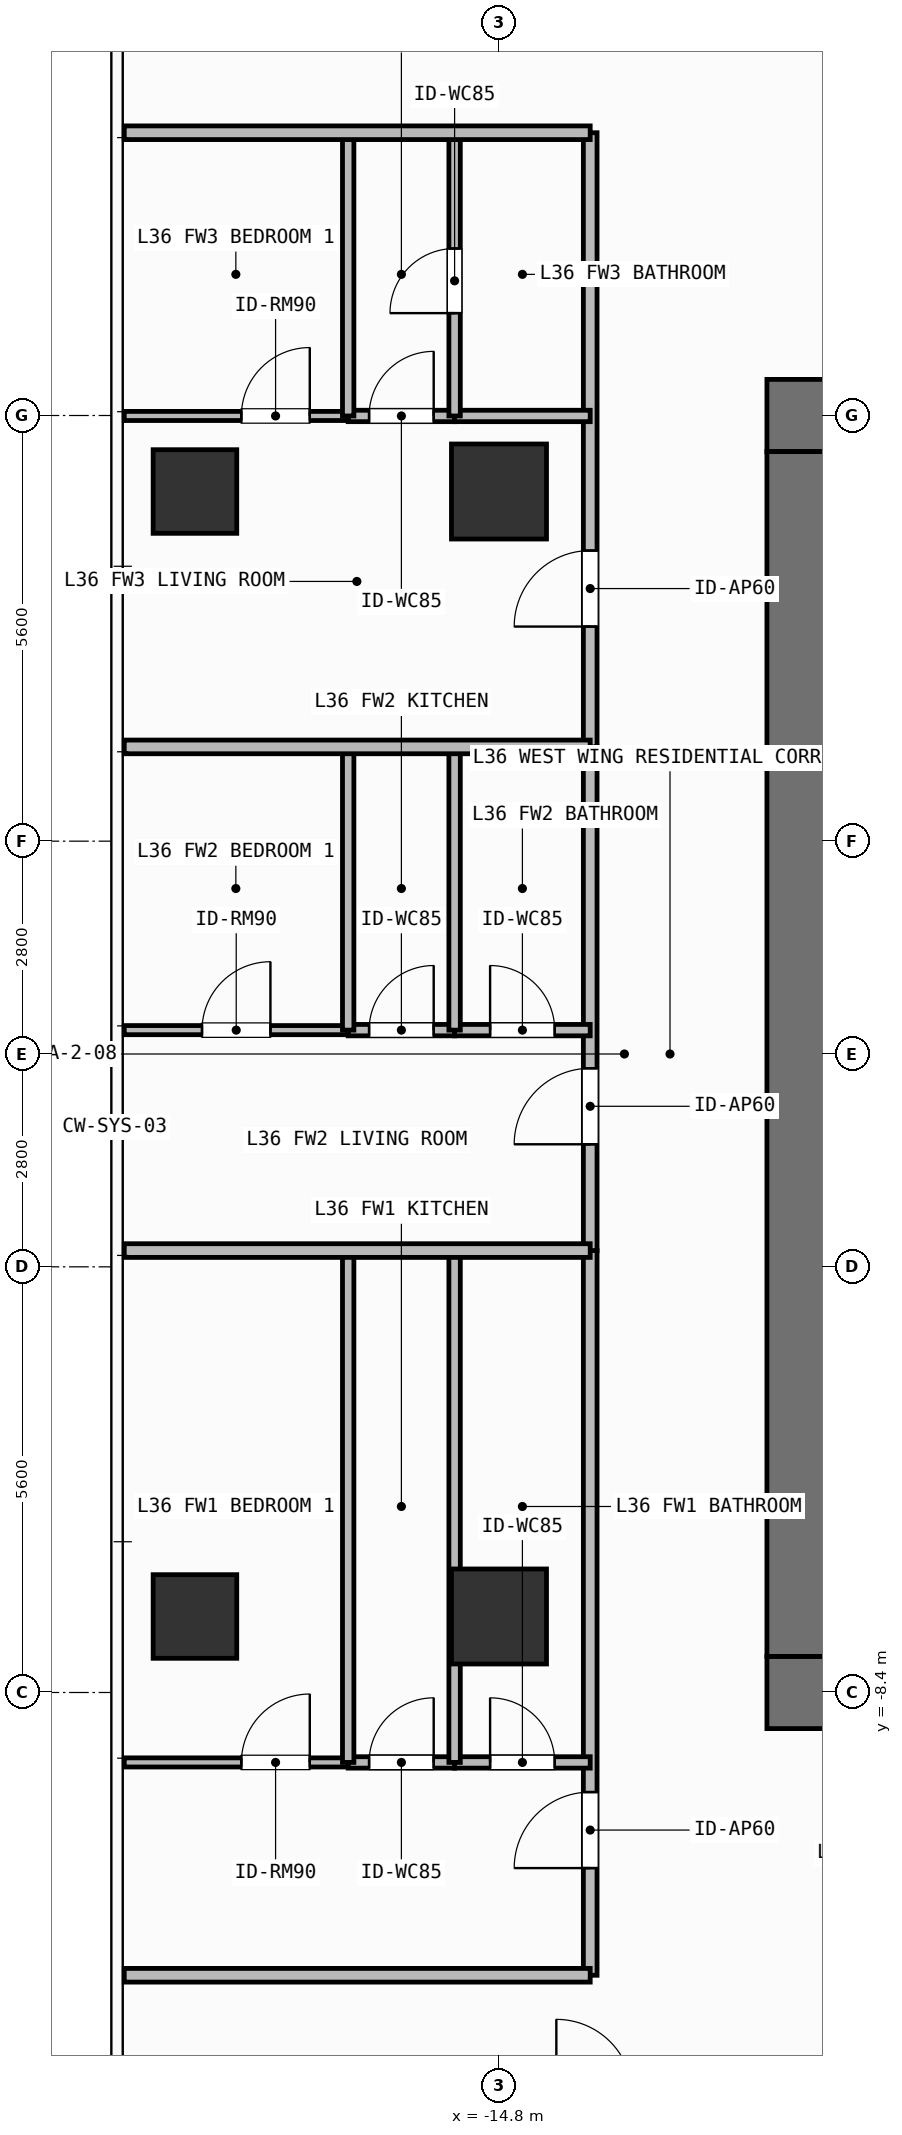
"""IFC4 building model, lengths in metres.
Left out: names, types, materials, properties, quantities, classifications, styles, units other than length and angle.
Written with IfcOpenShell. Run it as: python <this file> out.ifc"""

import sys

from ifc_helpers import new_model, si_unit, direction, frame, frame_2d, origin, origin_2d, place, context, subcontext, project, spatial, rectangle, extrude, element, fill, save


model = new_model("IFC4")
c1 = context("Model", 3, precision=1e-05, world=origin(), true_north=direction((0.0, 1.0)))
c2 = subcontext(c1, "Body", "Model", "MODEL_VIEW")
j1 = project(units=[si_unit("LENGTHUNIT", "METRE"), si_unit("PLANEANGLEUNIT", "RADIAN")], contexts=[c1])
p1 = place(None, origin())
s1 = spatial("IfcSite", under=j1, at=p1, CompositionType="ELEMENT")
p2 = place(p1, origin())
s2 = spatial("IfcBuilding", under=s1, at=p2, CompositionType="ELEMENT")
p3 = place(p2, frame((0.0, 0.0, 144.6)))
s3 = spatial("IfcBuildingStorey", under=s2, at=p3, CompositionType="ELEMENT", Elevation=144.6)
for number, where, z_axis, x_axis in (
    (1, (-11.275, -8.4, 0.0), (0.0, 0.0, 1.0), (1.0, 0.0, 0.0)),
    (2, (-11.275, 8.4, 0.0), (0.0, 0.0, 1.0), (1.0, 0.0, 0.0)),
):
    element("IfcWall", number, at=place(p3, frame(where, z_axis=z_axis, x_axis=x_axis)), inside=s3, PredefinedType="SHEAR", context=c2, shape_type="SweptSolid", body=[
        extrude(rectangle(XDim=1.575, YDim=0.95, at=frame_2d((0.788, 0.0))), origin(), (0.0, 0.0, 1.0), 3.9),
    ])
p4 = place(p3, frame((-10.8, -7.925, 0.0), z_axis=(0.0, 0.0, 1.0), x_axis=(0.0, 1.0, 0.0)))
e3 = element("IfcWall", 3, at=p4, inside=s3, PredefinedType="SHEAR", context=c2, shape_type="SweptSolid", body=[
    extrude(rectangle(XDim=15.85, YDim=0.95, at=frame_2d((7.925, 0.0))), origin(), (0.0, 0.0, 1.0), 3.9),
])
for number, where, z_axis, x_axis in (
    (4, (-14.8, -7.4, 0.0), (0.0, 0.0, 1.0), (1.0, 0.0, 0.0)),
    (5, (-14.8, 7.4, 0.0), (0.0, 0.0, 1.0), (1.0, 0.0, 0.0)),
):
    element("IfcColumn", number, at=place(p3, frame(where, z_axis=z_axis, x_axis=x_axis)), inside=s3, PredefinedType="COLUMN", context=c2, shape_type="SweptSolid", body=[
        extrude(rectangle(XDim=1.25, YDim=1.25, at=origin_2d()), origin(), (0.0, 0.0, 1.0), 3.9),
    ])
for number, where, z_axis, x_axis in (
    (6, (-18.8, -7.4, 0.0), (0.0, 0.0, 1.0), (1.0, 0.0, 0.0)),
    (7, (-18.8, 7.4, 0.0), (0.0, 0.0, 1.0), (1.0, 0.0, 0.0)),
):
    element("IfcColumn", number, at=place(p3, frame(where, z_axis=z_axis, x_axis=x_axis)), inside=s3, PredefinedType="COLUMN", context=c2, shape_type="SweptSolid", body=[
        extrude(rectangle(XDim=1.1, YDim=1.1, at=origin_2d()), origin(), (0.0, 0.0, 1.0), 3.9),
    ])
p5 = place(p3, frame((-13.6, -12.12, 0.0), z_axis=(0.0, 0.0, 1.0), x_axis=(0.0, 1.0, 0.0)))
e8 = element("IfcWall", 8, at=p5, inside=s3, PredefinedType="PARTITIONING", context=c2, shape_type="SweptSolid", body=[
    extrude(rectangle(XDim=9.534, YDim=0.18, at=frame_2d((4.767, 0.0))), origin(), (0.0, 0.0, 1.0), 3.68),
])
p6 = place(p5, frame((1.41, 0.0, 0.0)))
e9 = element("IfcOpeningElement", 9, at=p6, cuts=e8, PredefinedType="OPENING", context=c2, shape_type="SweptSolid", body=[
    extrude(rectangle(XDim=1.0, YDim=2.2, at=frame_2d((0.5, 1.1))), frame((0.0, 0.1, 0.0), z_axis=(0.0, -1.0, 0.0), x_axis=(1.0, 0.0, 0.0)), (0.0, 0.0, 1.0), 0.2),
])
p7 = place(p3, frame((-16.784, -9.32, 0.0), z_axis=(0.0, 0.0, 1.0), x_axis=(1.0, 0.0, 0.0)))
e10 = element("IfcWall", 10, at=p7, inside=s3, PredefinedType="PARTITIONING", context=c2, shape_type="SweptSolid", body=[
    extrude(rectangle(XDim=1.4, YDim=0.15, at=frame_2d((0.7, 0.0))), origin(), (0.0, 0.0, 1.0), 3.68),
])
p8 = place(p7, frame((0.275, 0.0, 0.0)))
e11 = element("IfcOpeningElement", 11, at=p8, cuts=e10, PredefinedType="OPENING", context=c2, shape_type="SweptSolid", body=[
    extrude(rectangle(XDim=0.85, YDim=2.1, at=frame_2d((0.425, 1.05))), frame((0.0, 0.085, 0.0), z_axis=(0.0, -1.0, 0.0), x_axis=(1.0, 0.0, 0.0)), (0.0, 0.0, 1.0), 0.17),
])
p9 = place(p3, frame((-15.384, -9.32, 0.0), z_axis=(0.0, 0.0, 1.0), x_axis=(1.0, 0.0, 0.0)))
e12 = element("IfcWall", 12, at=p9, inside=s3, PredefinedType="PARTITIONING", context=c2, shape_type="SweptSolid", body=[
    extrude(rectangle(XDim=1.784, YDim=0.15, at=frame_2d((0.892, 0.0))), origin(), (0.0, 0.0, 1.0), 3.68),
])
p10 = place(p9, frame((0.467, 0.0, 0.0)))
e13 = element("IfcOpeningElement", 13, at=p10, cuts=e12, PredefinedType="OPENING", context=c2, shape_type="SweptSolid", body=[
    extrude(rectangle(XDim=0.85, YDim=2.1, at=frame_2d((0.425, 1.05))), frame((0.0, 0.085, 0.0), z_axis=(0.0, -1.0, 0.0), x_axis=(1.0, 0.0, 0.0)), (0.0, 0.0, 1.0), 0.17),
])
p11 = place(p3, frame((-19.73, -9.32, 0.0), z_axis=(0.0, 0.0, 1.0), x_axis=(1.0, 0.0, 0.0)))
e14 = element("IfcWall", 14, at=p11, inside=s3, PredefinedType="PARTITIONING", context=c2, shape_type="SweptSolid", body=[
    extrude(rectangle(XDim=2.946, YDim=0.12, at=frame_2d((1.473, 0.0))), origin(), (0.0, 0.0, 1.0), 3.68),
])
p12 = place(p11, frame((1.541, 0.0, 0.0)))
e15 = element("IfcOpeningElement", 15, at=p12, cuts=e14, PredefinedType="OPENING", context=c2, shape_type="SweptSolid", body=[
    extrude(rectangle(XDim=0.9, YDim=2.1, at=frame_2d((0.45, 1.05))), frame((0.0, 0.07, 0.0), z_axis=(0.0, -1.0, 0.0), x_axis=(1.0, 0.0, 0.0)), (0.0, 0.0, 1.0), 0.14),
])
p13 = place(p3, frame((-13.6, -2.586, 0.0), z_axis=(0.0, 0.0, 1.0), x_axis=(0.0, 1.0, 0.0)))
e16 = element("IfcWall", 16, at=p13, inside=s3, PredefinedType="PARTITIONING", context=c2, shape_type="SweptSolid", body=[
    extrude(rectangle(XDim=6.626, YDim=0.18, at=frame_2d((3.313, 0.0))), origin(), (0.0, 0.0, 1.0), 3.68),
])
p14 = place(p13, frame((1.398, 0.0, 0.0)))
e17 = element("IfcOpeningElement", 17, at=p14, cuts=e16, PredefinedType="OPENING", context=c2, shape_type="SweptSolid", body=[
    extrude(rectangle(XDim=1.0, YDim=2.2, at=frame_2d((0.5, 1.1))), frame((0.0, 0.1, 0.0), z_axis=(0.0, -1.0, 0.0), x_axis=(1.0, 0.0, 0.0)), (0.0, 0.0, 1.0), 0.2),
])
p15 = place(p3, frame((-16.784, 0.314, 0.0), z_axis=(0.0, 0.0, 1.0), x_axis=(1.0, 0.0, 0.0)))
e18 = element("IfcWall", 18, at=p15, inside=s3, PredefinedType="PARTITIONING", context=c2, shape_type="SweptSolid", body=[
    extrude(rectangle(XDim=1.4, YDim=0.15, at=frame_2d((0.7, 0.0))), origin(), (0.0, 0.0, 1.0), 3.68),
])
p16 = place(p15, frame((0.275, 0.0, 0.0)))
e19 = element("IfcOpeningElement", 19, at=p16, cuts=e18, PredefinedType="OPENING", context=c2, shape_type="SweptSolid", body=[
    extrude(rectangle(XDim=0.85, YDim=2.1, at=frame_2d((0.425, 1.05))), frame((0.0, 0.085, 0.0), z_axis=(0.0, -1.0, 0.0), x_axis=(1.0, 0.0, 0.0)), (0.0, 0.0, 1.0), 0.17),
])
p17 = place(p3, frame((-15.384, 0.314, 0.0), z_axis=(0.0, 0.0, 1.0), x_axis=(1.0, 0.0, 0.0)))
e20 = element("IfcWall", 20, at=p17, inside=s3, PredefinedType="PARTITIONING", context=c2, shape_type="SweptSolid", body=[
    extrude(rectangle(XDim=1.784, YDim=0.15, at=frame_2d((0.892, 0.0))), origin(), (0.0, 0.0, 1.0), 3.68),
])
p18 = place(p17, frame((0.467, 0.0, 0.0)))
e21 = element("IfcOpeningElement", 21, at=p18, cuts=e20, PredefinedType="OPENING", context=c2, shape_type="SweptSolid", body=[
    extrude(rectangle(XDim=0.85, YDim=2.1, at=frame_2d((0.425, 1.05))), frame((0.0, 0.085, 0.0), z_axis=(0.0, -1.0, 0.0), x_axis=(1.0, 0.0, 0.0)), (0.0, 0.0, 1.0), 0.17),
])
p19 = place(p3, frame((-19.73, 0.314, 0.0), z_axis=(0.0, 0.0, 1.0), x_axis=(1.0, 0.0, 0.0)))
e22 = element("IfcWall", 22, at=p19, inside=s3, PredefinedType="PARTITIONING", context=c2, shape_type="SweptSolid", body=[
    extrude(rectangle(XDim=2.946, YDim=0.12, at=frame_2d((1.473, 0.0))), origin(), (0.0, 0.0, 1.0), 3.68),
])
p20 = place(p19, frame((1.023, 0.0, 0.0)))
e23 = element("IfcOpeningElement", 23, at=p20, cuts=e22, PredefinedType="OPENING", context=c2, shape_type="SweptSolid", body=[
    extrude(rectangle(XDim=0.9, YDim=2.1, at=frame_2d((0.45, 1.05))), frame((0.0, 0.07, 0.0), z_axis=(0.0, -1.0, 0.0), x_axis=(1.0, 0.0, 0.0)), (0.0, 0.0, 1.0), 0.14),
])
p21 = place(p3, frame((-13.6, 4.04, 0.0), z_axis=(0.0, 0.0, 1.0), x_axis=(0.0, 1.0, 0.0)))
e24 = element("IfcWall", 24, at=p21, inside=s3, PredefinedType="PARTITIONING", context=c2, shape_type="SweptSolid", body=[
    extrude(rectangle(XDim=8.08, YDim=0.18, at=frame_2d((4.04, 0.0))), origin(), (0.0, 0.0, 1.0), 3.68),
])
p22 = place(p21, frame((1.583, 0.0, 0.0)))
e25 = element("IfcOpeningElement", 25, at=p22, cuts=e24, PredefinedType="OPENING", context=c2, shape_type="SweptSolid", body=[
    extrude(rectangle(XDim=1.0, YDim=2.2, at=frame_2d((0.5, 1.1))), frame((0.0, 0.1, 0.0), z_axis=(0.0, -1.0, 0.0), x_axis=(1.0, 0.0, 0.0)), (0.0, 0.0, 1.0), 0.2),
])
p23 = place(p3, frame((-16.784, 8.394, 0.0), z_axis=(0.0, 0.0, 1.0), x_axis=(1.0, 0.0, 0.0)))
e26 = element("IfcWall", 26, at=p23, inside=s3, PredefinedType="PARTITIONING", context=c2, shape_type="SweptSolid", body=[
    extrude(rectangle(XDim=1.4, YDim=0.15, at=frame_2d((0.7, 0.0))), origin(), (0.0, 0.0, 1.0), 3.68),
])
p24 = place(p23, frame((0.275, 0.0, 0.0)))
e27 = element("IfcOpeningElement", 27, at=p24, cuts=e26, PredefinedType="OPENING", context=c2, shape_type="SweptSolid", body=[
    extrude(rectangle(XDim=0.85, YDim=2.1, at=frame_2d((0.425, 1.05))), frame((0.0, 0.085, 0.0), z_axis=(0.0, -1.0, 0.0), x_axis=(1.0, 0.0, 0.0)), (0.0, 0.0, 1.0), 0.17),
])
p25 = place(p3, frame((-15.384, 8.394, 0.0), z_axis=(0.0, 0.0, 1.0), x_axis=(1.0, 0.0, 0.0)))
e28 = element("IfcWall", 28, at=p25, inside=s3, PredefinedType="PARTITIONING", context=c2, shape_type="SweptSolid", body=[
    extrude(rectangle(XDim=1.784, YDim=0.15, at=frame_2d((0.892, 0.0))), origin(), (0.0, 0.0, 1.0), 3.68),
])
p26 = place(p3, frame((-19.73, 8.394, 0.0), z_axis=(0.0, 0.0, 1.0), x_axis=(1.0, 0.0, 0.0)))
e29 = element("IfcWall", 29, at=p26, inside=s3, PredefinedType="PARTITIONING", context=c2, shape_type="SweptSolid", body=[
    extrude(rectangle(XDim=2.946, YDim=0.12, at=frame_2d((1.473, 0.0))), origin(), (0.0, 0.0, 1.0), 3.68),
])
p27 = place(p26, frame((1.541, 0.0, 0.0)))
e30 = element("IfcOpeningElement", 30, at=p27, cuts=e29, PredefinedType="OPENING", context=c2, shape_type="SweptSolid", body=[
    extrude(rectangle(XDim=0.9, YDim=2.1, at=frame_2d((0.45, 1.05))), frame((0.0, 0.07, 0.0), z_axis=(0.0, -1.0, 0.0), x_axis=(1.0, 0.0, 0.0)), (0.0, 0.0, 1.0), 0.14),
])
for number, where, z_axis, x_axis in (
    (31, (-15.384, -9.32, 0.0), (0.0, 0.0, 1.0), (0.0, 1.0, 0.0)),
    (32, (-16.784, -9.32, 0.0), (0.0, 0.0, 1.0), (0.0, 1.0, 0.0)),
):
    element("IfcWall", number, at=place(p3, frame(where, z_axis=z_axis, x_axis=x_axis)), inside=s3, PredefinedType="PARTITIONING", context=c2, shape_type="SweptSolid", body=[
        extrude(rectangle(XDim=6.734, YDim=0.15, at=frame_2d((3.367, 0.0))), origin(), (0.0, 0.0, 1.0), 3.68),
    ])
for number, where, z_axis, x_axis in (
    (33, (-15.384, 0.314, 0.0), (0.0, 0.0, 1.0), (0.0, 1.0, 0.0)),
    (34, (-16.784, 0.314, 0.0), (0.0, 0.0, 1.0), (0.0, 1.0, 0.0)),
):
    element("IfcWall", number, at=place(p3, frame(where, z_axis=z_axis, x_axis=x_axis)), inside=s3, PredefinedType="PARTITIONING", context=c2, shape_type="SweptSolid", body=[
        extrude(rectangle(XDim=3.726, YDim=0.15, at=frame_2d((1.863, 0.0))), origin(), (0.0, 0.0, 1.0), 3.68),
    ])
p28 = place(p3, frame((-19.73, -2.586, 0.0), z_axis=(0.0, 0.0, 1.0), x_axis=(1.0, 0.0, 0.0)))
e35 = element("IfcWall", 35, at=p28, inside=s3, PredefinedType="PARTITIONING", context=c2, shape_type="SweptSolid", body=[
    extrude(rectangle(XDim=6.13, YDim=0.18, at=frame_2d((3.065, 0.0))), origin(), (0.0, 0.0, 1.0), 3.68),
])
p29 = place(p3, frame((-15.384, 8.394, 0.0), z_axis=(0.0, 0.0, 1.0), x_axis=(0.0, 1.0, 0.0)))
e36 = element("IfcWall", 36, at=p29, inside=s3, PredefinedType="PARTITIONING", context=c2, shape_type="SweptSolid", body=[
    extrude(rectangle(XDim=3.726, YDim=0.15, at=frame_2d((1.863, 0.0))), origin(), (0.0, 0.0, 1.0), 3.68),
])
p30 = place(p29, frame((1.353, 0.0, 0.0)))
e37 = element("IfcOpeningElement", 37, at=p30, cuts=e36, PredefinedType="OPENING", context=c2, shape_type="SweptSolid", body=[
    extrude(rectangle(XDim=0.85, YDim=2.1, at=frame_2d((0.425, 1.05))), frame((0.0, 0.085, 0.0), z_axis=(0.0, -1.0, 0.0), x_axis=(1.0, 0.0, 0.0)), (0.0, 0.0, 1.0), 0.17),
])
p31 = place(p3, frame((-16.784, 8.394, 0.0), z_axis=(0.0, 0.0, 1.0), x_axis=(0.0, 1.0, 0.0)))
e38 = element("IfcWall", 38, at=p31, inside=s3, PredefinedType="PARTITIONING", context=c2, shape_type="SweptSolid", body=[
    extrude(rectangle(XDim=3.726, YDim=0.15, at=frame_2d((1.863, 0.0))), origin(), (0.0, 0.0, 1.0), 3.68),
])
for number, where, z_axis, x_axis in (
    (39, (-19.73, 4.04, 0.0), (0.0, 0.0, 1.0), (1.0, 0.0, 0.0)),
    (40, (-19.73, -12.12, 0.0), (0.0, 0.0, 1.0), (1.0, 0.0, 0.0)),
    (41, (-19.73, 12.12, 0.0), (0.0, 0.0, 1.0), (1.0, 0.0, 0.0)),
):
    element("IfcWall", number, at=place(p3, frame(where, z_axis=z_axis, x_axis=x_axis)), inside=s3, PredefinedType="PARTITIONING", context=c2, shape_type="SweptSolid", body=[
        extrude(rectangle(XDim=6.13, YDim=0.18, at=frame_2d((3.065, 0.0))), origin(), (0.0, 0.0, 1.0), 3.68),
    ])
p32 = place(p6, origin())
e42 = element("IfcDoor", 42, at=p32, inside=s3, OperationType="SINGLE_SWING_LEFT", PredefinedType="DOOR", context=c2, shape_type="SweptSolid", body=[
    extrude(rectangle(XDim=1.0, YDim=2.2, at=frame_2d((0.5, 1.1))), frame((0.0, 0.025, 0.0), z_axis=(0.0, -1.0, 0.0), x_axis=(1.0, 0.0, 0.0)), (0.0, 0.0, 1.0), 0.05),
])
fill(e9, e42)
p33 = place(p8, origin())
e43 = element("IfcDoor", 43, at=p33, inside=s3, OperationType="SINGLE_SWING_RIGHT", PredefinedType="DOOR", context=c2, shape_type="SweptSolid", body=[
    extrude(rectangle(XDim=0.85, YDim=2.1, at=frame_2d((0.425, 1.05))), frame((0.0, 0.025, 0.0), z_axis=(0.0, -1.0, 0.0), x_axis=(1.0, 0.0, 0.0)), (0.0, 0.0, 1.0), 0.05),
])
fill(e11, e43)
p34 = place(p10, origin())
e44 = element("IfcDoor", 44, at=p34, inside=s3, OperationType="SINGLE_SWING_LEFT", PredefinedType="DOOR", context=c2, shape_type="SweptSolid", body=[
    extrude(rectangle(XDim=0.85, YDim=2.1, at=frame_2d((0.425, 1.05))), frame((0.0, 0.025, 0.0), z_axis=(0.0, -1.0, 0.0), x_axis=(1.0, 0.0, 0.0)), (0.0, 0.0, 1.0), 0.05),
])
fill(e13, e44)
p35 = place(p12, origin())
e45 = element("IfcDoor", 45, at=p35, inside=s3, OperationType="SINGLE_SWING_RIGHT", PredefinedType="DOOR", context=c2, shape_type="SweptSolid", body=[
    extrude(rectangle(XDim=0.9, YDim=2.1, at=frame_2d((0.45, 1.05))), frame((0.0, 0.025, 0.0), z_axis=(0.0, -1.0, 0.0), x_axis=(1.0, 0.0, 0.0)), (0.0, 0.0, 1.0), 0.05),
])
fill(e15, e45)
p36 = place(p14, origin())
e46 = element("IfcDoor", 46, at=p36, inside=s3, OperationType="SINGLE_SWING_LEFT", PredefinedType="DOOR", context=c2, shape_type="SweptSolid", body=[
    extrude(rectangle(XDim=1.0, YDim=2.2, at=frame_2d((0.5, 1.1))), frame((0.0, 0.025, 0.0), z_axis=(0.0, -1.0, 0.0), x_axis=(1.0, 0.0, 0.0)), (0.0, 0.0, 1.0), 0.05),
])
fill(e17, e46)
p37 = place(p16, origin())
e47 = element("IfcDoor", 47, at=p37, inside=s3, OperationType="SINGLE_SWING_RIGHT", PredefinedType="DOOR", context=c2, shape_type="SweptSolid", body=[
    extrude(rectangle(XDim=0.85, YDim=2.1, at=frame_2d((0.425, 1.05))), frame((0.0, 0.025, 0.0), z_axis=(0.0, -1.0, 0.0), x_axis=(1.0, 0.0, 0.0)), (0.0, 0.0, 1.0), 0.05),
])
fill(e19, e47)
p38 = place(p18, origin())
e48 = element("IfcDoor", 48, at=p38, inside=s3, OperationType="SINGLE_SWING_LEFT", PredefinedType="DOOR", context=c2, shape_type="SweptSolid", body=[
    extrude(rectangle(XDim=0.85, YDim=2.1, at=frame_2d((0.425, 1.05))), frame((0.0, 0.025, 0.0), z_axis=(0.0, -1.0, 0.0), x_axis=(1.0, 0.0, 0.0)), (0.0, 0.0, 1.0), 0.05),
])
fill(e21, e48)
p39 = place(p20, origin())
e49 = element("IfcDoor", 49, at=p39, inside=s3, OperationType="SINGLE_SWING_RIGHT", PredefinedType="DOOR", context=c2, shape_type="SweptSolid", body=[
    extrude(rectangle(XDim=0.9, YDim=2.1, at=frame_2d((0.45, 1.05))), frame((0.0, 0.025, 0.0), z_axis=(0.0, -1.0, 0.0), x_axis=(1.0, 0.0, 0.0)), (0.0, 0.0, 1.0), 0.05),
])
fill(e23, e49)
p40 = place(p22, origin())
e50 = element("IfcDoor", 50, at=p40, inside=s3, OperationType="SINGLE_SWING_LEFT", PredefinedType="DOOR", context=c2, shape_type="SweptSolid", body=[
    extrude(rectangle(XDim=1.0, YDim=2.2, at=frame_2d((0.5, 1.1))), frame((0.0, 0.025, 0.0), z_axis=(0.0, -1.0, 0.0), x_axis=(1.0, 0.0, 0.0)), (0.0, 0.0, 1.0), 0.05),
])
fill(e25, e50)
p41 = place(p24, origin())
e51 = element("IfcDoor", 51, at=p41, inside=s3, OperationType="SINGLE_SWING_RIGHT", PredefinedType="DOOR", context=c2, shape_type="SweptSolid", body=[
    extrude(rectangle(XDim=0.85, YDim=2.1, at=frame_2d((0.425, 1.05))), frame((0.0, 0.025, 0.0), z_axis=(0.0, -1.0, 0.0), x_axis=(1.0, 0.0, 0.0)), (0.0, 0.0, 1.0), 0.05),
])
fill(e27, e51)
p42 = place(p30, origin())
e52 = element("IfcDoor", 52, at=p42, inside=s3, OperationType="SINGLE_SWING_LEFT", PredefinedType="DOOR", context=c2, shape_type="SweptSolid", body=[
    extrude(rectangle(XDim=0.85, YDim=2.1, at=frame_2d((0.425, 1.05))), frame((0.0, 0.025, 0.0), z_axis=(0.0, -1.0, 0.0), x_axis=(1.0, 0.0, 0.0)), (0.0, 0.0, 1.0), 0.05),
])
fill(e37, e52)
p43 = place(p27, origin())
e53 = element("IfcDoor", 53, at=p43, inside=s3, OperationType="SINGLE_SWING_RIGHT", PredefinedType="DOOR", context=c2, shape_type="SweptSolid", body=[
    extrude(rectangle(XDim=0.9, YDim=2.1, at=frame_2d((0.45, 1.05))), frame((0.0, 0.025, 0.0), z_axis=(0.0, -1.0, 0.0), x_axis=(1.0, 0.0, 0.0)), (0.0, 0.0, 1.0), 0.05),
])
fill(e30, e53)
save(model, sys.argv[1])
